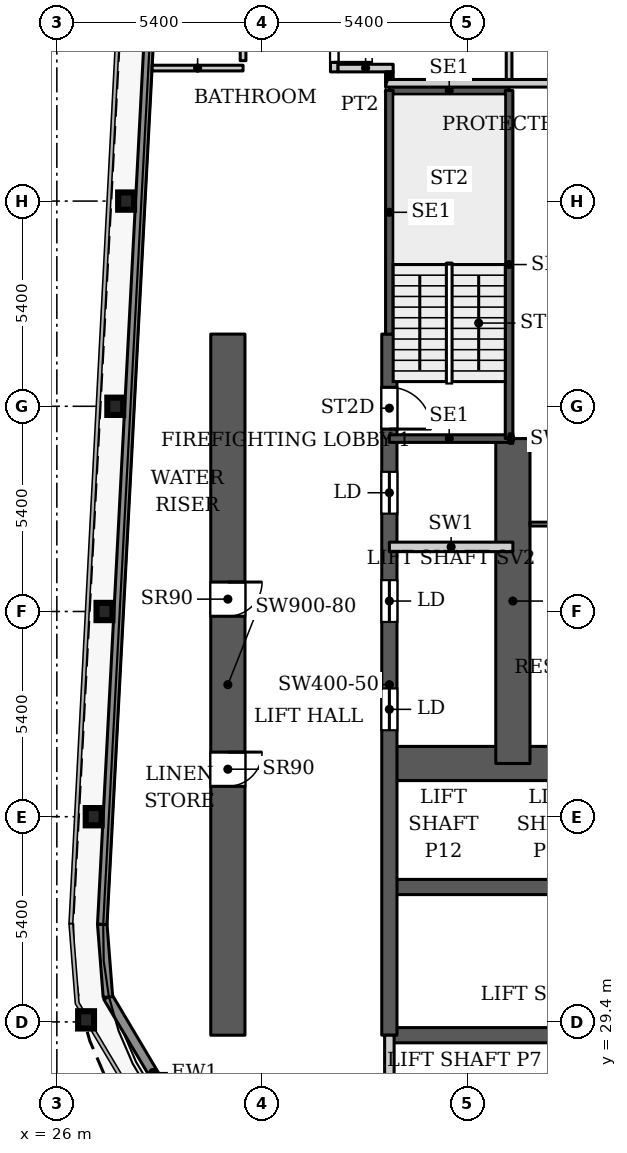
"""IFC4 building model, lengths in metres.
Left out: names, types, materials, properties, quantities, classifications, styles, units other than length and angle.
Written with IfcOpenShell. Run it as: python <this file> out.ifc"""

import sys

from ifc_helpers import new_model, si_unit, direction, frame, frame_2d, origin, origin_2d, place, context, subcontext, project, spatial, rectangle, i_section, extrude, source, transform, mapped, element, fill, save


model = new_model("IFC4")
c1 = context("Model", 3, precision=1e-05, world=origin(), true_north=direction((0.0, 1.0)))
c2 = subcontext(c1, "Body", "Model", "MODEL_VIEW")
j1 = project(units=[si_unit("LENGTHUNIT", "METRE"), si_unit("PLANEANGLEUNIT", "RADIAN")], contexts=[c1])
p1 = place(None, origin())
s1 = spatial("IfcSite", under=j1, at=p1, CompositionType="ELEMENT")
p2 = place(p1, origin())
s2 = spatial("IfcBuilding", under=s1, at=p2, CompositionType="ELEMENT")
p3 = place(p2, frame((0.0, 0.0, 125.3)))
s3 = spatial("IfcBuildingStorey", under=s2, at=p3, CompositionType="ELEMENT", Elevation=125.3)
for number, where, z_axis, x_axis in (
    (1, (26.769, 29.454, 0.0), (0.0, 0.0, 1.0), (1.0, 0.0, 0.0)),
    (2, (26.969, 34.8, 0.0), (0.0, 0.0, 1.0), (1.0, 0.0, 0.0)),
    (3, (27.253, 40.2, 0.0), (0.0, 0.0, 1.0), (1.0, 0.0, 0.0)),
    (4, (27.537, 45.6, 0.0), (0.0, 0.0, 1.0), (1.0, 0.0, 0.0)),
    (5, (27.822, 51.0, 0.0), (0.0, 0.0, 1.0), (1.0, 0.0, 0.0)),
):
    element("IfcColumn", number, at=place(p3, frame(where, z_axis=z_axis, x_axis=x_axis)), inside=s3, PredefinedType="COLUMN", context=c2, shape_type="SweptSolid", body=[
        extrude(i_section(OverallWidth=0.418, OverallDepth=0.455, WebThickness=0.042, FlangeThickness=0.068, FilletRadius=0.014, at=origin_2d()), origin(), (0.0, 0.0, 1.0), 3.9),
    ])
p4 = place(p3, frame((34.75, 29.05, 0.0), z_axis=(0.0, 0.0, 1.0), x_axis=(1.0, 0.0, 0.0)))
e6 = element("IfcWall", 6, at=p4, inside=s3, PredefinedType="SHEAR", context=c2, shape_type="SweptSolid", body=[
    extrude(rectangle(XDim=18.4, YDim=0.4, at=frame_2d((9.2, 0.0))), origin(), (0.0, 0.0, 1.0), 3.9),
])
p5 = place(p4, frame((15.125, 0.0, 0.0)))
e7 = element("IfcOpeningElement", 7, at=p5, cuts=e6, PredefinedType="OPENING", context=c2, shape_type="SweptSolid", body=[
    extrude(rectangle(XDim=1.1, YDim=2.2, at=frame_2d((0.55, 1.1))), frame((0.0, 0.21, 0.0), z_axis=(0.0, -1.0, 0.0), x_axis=(1.0, 0.0, 0.0)), (0.0, 0.0, 1.0), 0.42),
])
p6 = place(p3, frame((34.75, 32.95, 0.0), z_axis=(0.0, 0.0, 1.0), x_axis=(1.0, 0.0, 0.0)))
e8 = element("IfcWall", 8, at=p6, inside=s3, PredefinedType="SHEAR", context=c2, shape_type="SweptSolid", body=[
    extrude(rectangle(XDim=14.25, YDim=0.4, at=frame_2d((7.125, 0.0))), origin(), (0.0, 0.0, 1.0), 3.9),
])
p7 = place(p3, frame((34.75, 36.2, 0.0), z_axis=(0.0, 0.0, 1.0), x_axis=(1.0, 0.0, 0.0)))
e9 = element("IfcWall", 9, at=p7, inside=s3, PredefinedType="SHEAR", context=c2, shape_type="SweptSolid", body=[
    extrude(rectangle(XDim=18.4, YDim=0.9, at=frame_2d((9.2, 0.0))), origin(), (0.0, 0.0, 1.0), 3.9),
])
p8 = place(p7, frame((16.9, 0.0, 0.0)))
e10 = element("IfcOpeningElement", 10, at=p8, cuts=e9, PredefinedType="OPENING", context=c2, shape_type="SweptSolid", body=[
    extrude(rectangle(XDim=1.0, YDim=2.2, at=frame_2d((0.5, 1.1))), frame((0.0, 0.46, 0.0), z_axis=(0.0, -1.0, 0.0), x_axis=(1.0, 0.0, 0.0)), (0.0, 0.0, 1.0), 0.92),
])
p9 = place(p3, frame((34.75, 29.05, 0.0), z_axis=(0.0, 0.0, 1.0), x_axis=(0.0, 1.0, 0.0)))
e11 = element("IfcWall", 11, at=p9, inside=s3, PredefinedType="SHEAR", context=c2, shape_type="SweptSolid", body=[
    extrude(rectangle(XDim=18.45, YDim=0.4, at=frame_2d((9.225, 0.0))), origin(), (0.0, 0.0, 1.0), 3.9),
])
p10 = place(p9, frame((8.025, 0.0, 0.0)))
e12 = element("IfcOpeningElement", 12, at=p10, cuts=e11, PredefinedType="OPENING", context=c2, shape_type="SweptSolid", body=[
    extrude(rectangle(XDim=1.1, YDim=2.2, at=frame_2d((0.55, 1.1))), frame((0.0, 0.21, 0.0), z_axis=(0.0, -1.0, 0.0), x_axis=(1.0, 0.0, 0.0)), (0.0, 0.0, 1.0), 0.42),
])
p11 = place(p9, frame((10.875, 0.0, 0.0)))
e13 = element("IfcOpeningElement", 13, at=p11, cuts=e11, PredefinedType="OPENING", context=c2, shape_type="SweptSolid", body=[
    extrude(rectangle(XDim=1.1, YDim=2.2, at=frame_2d((0.55, 1.1))), frame((0.0, 0.21, 0.0), z_axis=(0.0, -1.0, 0.0), x_axis=(1.0, 0.0, 0.0)), (0.0, 0.0, 1.0), 0.42),
])
p12 = place(p9, frame((13.725, 0.0, 0.0)))
e14 = element("IfcOpeningElement", 14, at=p12, cuts=e11, PredefinedType="OPENING", context=c2, shape_type="SweptSolid", body=[
    extrude(rectangle(XDim=1.1, YDim=2.2, at=frame_2d((0.55, 1.1))), frame((0.0, 0.21, 0.0), z_axis=(0.0, -1.0, 0.0), x_axis=(1.0, 0.0, 0.0)), (0.0, 0.0, 1.0), 0.42),
])
p13 = place(p9, frame((15.95, 0.0, 0.0)))
e15 = element("IfcOpeningElement", 15, at=p13, cuts=e11, PredefinedType="OPENING", context=c2, shape_type="SweptSolid", body=[
    extrude(rectangle(XDim=1.1, YDim=2.2, at=frame_2d((0.55, 1.1))), frame((0.0, 0.21, 0.0), z_axis=(0.0, -1.0, 0.0), x_axis=(1.0, 0.0, 0.0)), (0.0, 0.0, 1.0), 0.42),
])
p14 = place(p3, frame((38.0, 36.2, 0.0), z_axis=(0.0, 0.0, 1.0), x_axis=(0.0, 1.0, 0.0)))
e16 = element("IfcWall", 16, at=p14, inside=s3, PredefinedType="SHEAR", context=c2, shape_type="SweptSolid", body=[
    extrude(rectangle(XDim=8.55, YDim=0.9, at=frame_2d((4.275, 0.0))), origin(), (0.0, 0.0, 1.0), 3.9),
])
p15 = place(p3, frame((30.5, 29.05, 0.0), z_axis=(0.0, 0.0, 1.0), x_axis=(0.0, 1.0, 0.0)))
e17 = element("IfcWall", 17, at=p15, inside=s3, PredefinedType="SHEAR", context=c2, shape_type="SweptSolid", body=[
    extrude(rectangle(XDim=18.45, YDim=0.9, at=frame_2d((9.225, 0.0))), origin(), (0.0, 0.0, 1.0), 3.9),
])
p16 = place(p15, frame((6.55, 0.0, 0.0)))
e18 = element("IfcOpeningElement", 18, at=p16, cuts=e17, PredefinedType="OPENING", context=c2, shape_type="SweptSolid", body=[
    extrude(rectangle(XDim=0.9, YDim=2.2, at=frame_2d((0.45, 1.1))), frame((0.0, 0.46, 0.0), z_axis=(0.0, -1.0, 0.0), x_axis=(1.0, 0.0, 0.0)), (0.0, 0.0, 1.0), 0.92),
])
p17 = place(p15, frame((11.025, 0.0, 0.0)))
e19 = element("IfcOpeningElement", 19, at=p17, cuts=e17, PredefinedType="OPENING", context=c2, shape_type="SweptSolid", body=[
    extrude(rectangle(XDim=0.9, YDim=2.2, at=frame_2d((0.45, 1.1))), frame((0.0, 0.46, 0.0), z_axis=(0.0, -1.0, 0.0), x_axis=(1.0, 0.0, 0.0)), (0.0, 0.0, 1.0), 0.92),
])
p18 = place(p3, frame((29.712, 26.072, 0.0), z_axis=(0.0, 0.0, 1.0), x_axis=(-0.511028049012, 0.859564036662, 0.0)))
e20 = element("IfcWall", 20, at=p18, inside=s3, PredefinedType="SOLIDWALL", context=c2, shape_type="SweptSolid", body=[
    extrude(rectangle(XDim=4.634, YDim=0.25, at=frame_2d((2.317, 0.0))), origin(), (0.0, 0.0, 1.0), 3.147),
])
p19 = place(p3, frame((27.344, 30.055, 0.0), z_axis=(0.0, 0.0, 1.0), x_axis=(-0.077571675317, 0.99698677784, 0.0)))
e21 = element("IfcWall", 21, at=p19, inside=s3, PredefinedType="SOLIDWALL", context=c2, shape_type="SweptSolid", body=[
    extrude(rectangle(XDim=1.92, YDim=0.25, at=frame_2d((0.96, 0.0))), origin(), (0.0, 0.0, 1.0), 3.75),
])
p20 = place(p3, frame((27.195, 31.969, 0.0), z_axis=(0.0, 0.0, 1.0), x_axis=(0.052554995867, 0.998618031286, 0.0)))
e22 = element("IfcWall", 22, at=p20, inside=s3, PredefinedType="SOLIDWALL", context=c2, shape_type="SweptSolid", body=[
    extrude(rectangle(XDim=66.787, YDim=0.25, at=frame_2d((33.394, 0.0))), origin(), (0.0, 0.0, 1.0), 3.75),
])
for number, where, z_axis, x_axis in (
    (23, (34.75, 44.75, 0.0), (0.0, 0.0, 1.0), (1.0, 0.0, 0.0)),
    (24, (34.75, 53.91, 0.0), (0.0, 0.0, 1.0), (1.0, 0.0, 0.0)),
):
    element("IfcWall", number, at=place(p3, frame(where, z_axis=z_axis, x_axis=x_axis)), inside=s3, PredefinedType="SHEAR", context=c2, shape_type="SweptSolid", body=[
        extrude(rectangle(XDim=3.15, YDim=0.2, at=frame_2d((1.575, 0.0))), origin(), (0.0, 0.0, 1.0), 3.9),
    ])
p21 = place(p3, frame((34.75, 47.5, 0.0), z_axis=(0.0, 0.0, 1.0), x_axis=(0.0, 1.0, 0.0)))
e25 = element("IfcWall", 25, at=p21, inside=s3, PredefinedType="SHEAR", context=c2, shape_type="SweptSolid", body=[
    extrude(rectangle(XDim=6.41, YDim=0.2, at=frame_2d((3.205, 0.0))), origin(), (0.0, 0.0, 1.0), 3.9),
])
p22 = place(p3, frame((37.9, 44.75, 0.0), z_axis=(0.0, 0.0, 1.0), x_axis=(0.0, 1.0, 0.0)))
e26 = element("IfcWall", 26, at=p22, inside=s3, PredefinedType="SHEAR", context=c2, shape_type="SweptSolid", body=[
    extrude(rectangle(XDim=9.16, YDim=0.2, at=frame_2d((4.58, 0.0))), origin(), (0.0, 0.0, 1.0), 3.9),
])
for number, where, z_axis, x_axis in (
    (27, (34.75, 25.8, 0.0), (0.0, 0.0, 1.0), (0.0, 1.0, 0.0)),
    (28, (34.75, 41.9, 0.0), (0.0, 0.0, 1.0), (1.0, 0.0, 0.0)),
):
    element("IfcWall", number, at=place(p3, frame(where, z_axis=z_axis, x_axis=x_axis)), inside=s3, PredefinedType="PARTITIONING", context=c2, shape_type="SweptSolid", body=[
        extrude(rectangle(XDim=3.25, YDim=0.25, at=frame_2d((1.625, 0.0))), origin(), (0.0, 0.0, 1.0), 3.9),
    ])
p23 = place(p3, frame((37.9, 44.75, 0.0), z_axis=(0.0, 0.0, 1.0), x_axis=(1.0, 0.0, 0.0)))
e29 = element("IfcWall", 29, at=p23, inside=s3, PredefinedType="PARTITIONING", context=c2, shape_type="SweptSolid", body=[
    extrude(rectangle(XDim=0.1, YDim=0.25, at=frame_2d((0.05, 0.0))), origin(), (0.0, 0.0, 1.0), 3.9),
])
p24 = place(p3, frame((28.508, 54.5, 0.0), z_axis=(0.0, 0.0, 1.0), x_axis=(1.0, 0.0, 0.0)))
e30 = element("IfcWall", 30, at=p24, inside=s3, PredefinedType="PARTITIONING", context=c2, shape_type="SweptSolid", body=[
    extrude(rectangle(XDim=2.392, YDim=0.15, at=frame_2d((1.196, 0.0))), origin(), (0.0, 0.0, 1.0), 3.9),
])
p25 = place(p3, frame((30.9, 54.695, 0.0), z_axis=(0.0, 0.0, 1.0), x_axis=(0.0, 1.0, 0.0)))
e31 = element("IfcWall", 31, at=p25, inside=s3, PredefinedType="PARTITIONING", context=c2, shape_type="SweptSolid", body=[
    extrude(rectangle(XDim=10.105, YDim=0.15, at=frame_2d((5.052, 0.0))), origin(), (0.0, 0.0, 1.0), 3.072),
])
p26 = place(p25, frame((4.505, 0.0, 0.0)))
e32 = element("IfcOpeningElement", 32, at=p26, cuts=e31, PredefinedType="OPENING", context=c2, shape_type="SweptSolid", body=[
    extrude(rectangle(XDim=0.9, YDim=2.2, at=frame_2d((0.45, 1.1))), frame((0.0, 0.085, 0.0), z_axis=(0.0, -1.0, 0.0), x_axis=(1.0, 0.0, 0.0)), (0.0, 0.0, 1.0), 0.17),
])
p27 = place(p3, frame((33.3, 54.4, 0.0), z_axis=(0.0, 0.0, 1.0), x_axis=(0.0, 1.0, 0.0)))
e33 = element("IfcWall", 33, at=p27, inside=s3, PredefinedType="PARTITIONING", context=c2, shape_type="SweptSolid", body=[
    extrude(rectangle(XDim=24.95, YDim=0.2, at=frame_2d((12.475, 0.0))), origin(), (0.0, 0.0, 1.0), 3.6),
])
p28 = place(p27, frame((0.25, 0.0, 0.0)))
e34 = element("IfcOpeningElement", 34, at=p28, cuts=e33, PredefinedType="OPENING", context=c2, shape_type="SweptSolid", body=[
    extrude(rectangle(XDim=1.0, YDim=2.1, at=frame_2d((0.5, 1.05))), frame((0.0, 0.11, 0.0), z_axis=(0.0, -1.0, 0.0), x_axis=(1.0, 0.0, 0.0)), (0.0, 0.0, 1.0), 0.22),
])
p29 = place(p27, frame((20.5, 0.0, 0.0)))
e35 = element("IfcOpeningElement", 35, at=p29, cuts=e33, PredefinedType="OPENING", context=c2, shape_type="SweptSolid", body=[
    extrude(rectangle(XDim=1.0, YDim=2.1, at=frame_2d((0.5, 1.05))), frame((0.0, 0.11, 0.0), z_axis=(0.0, -1.0, 0.0), x_axis=(1.0, 0.0, 0.0)), (0.0, 0.0, 1.0), 0.22),
])
p30 = place(p3, frame((33.4, 54.5, 0.0), z_axis=(0.0, 0.0, 1.0), x_axis=(1.0, 0.0, 0.0)))
e36 = element("IfcWall", 36, at=p30, inside=s3, PredefinedType="PARTITIONING", context=c2, shape_type="SweptSolid", body=[
    extrude(rectangle(XDim=1.45, YDim=0.2, at=frame_2d((0.725, 0.0))), origin(), (0.0, 0.0, 1.0), 3.6),
])
p31 = place(p3, frame((34.65, 54.1, 0.0), z_axis=(0.0, 0.0, 1.0), x_axis=(1.0, 0.0, 0.0)))
e37 = element("IfcWall", 37, at=p31, inside=s3, PredefinedType="PARTITIONING", context=c2, shape_type="SweptSolid", body=[
    extrude(rectangle(XDim=11.25, YDim=0.2, at=frame_2d((5.625, 0.0))), origin(), (0.0, 0.0, 1.0), 3.6),
])
p32 = place(p3, frame((34.75, 54.2, 0.0), z_axis=(0.0, 0.0, 1.0), x_axis=(0.0, 1.0, 0.0)))
e38 = element("IfcWall", 38, at=p32, inside=s3, PredefinedType="PARTITIONING", context=c2, shape_type="SweptSolid", body=[
    extrude(rectangle(XDim=0.2, YDim=0.2, at=frame_2d((0.1, 0.0))), origin(), (0.0, 0.0, 1.0), 3.6),
])
p33 = place(p3, frame((37.9, 54.2, 0.0), z_axis=(0.0, 0.0, 1.0), x_axis=(0.0, 1.0, 0.0)))
e39 = element("IfcWall", 39, at=p33, inside=s3, PredefinedType="PARTITIONING", context=c2, shape_type="SweptSolid", body=[
    extrude(rectangle(XDim=9.4, YDim=0.15, at=frame_2d((4.7, 0.0))), origin(), (0.0, 0.0, 1.0), 3.6),
])
p34 = place(p33, frame((7.1, 0.0, 0.0)))
e40 = element("IfcOpeningElement", 40, at=p34, cuts=e39, PredefinedType="OPENING", context=c2, shape_type="SweptSolid", body=[
    extrude(rectangle(XDim=0.9, YDim=2.1, at=frame_2d((0.45, 1.05))), frame((0.0, 0.085, 0.0), z_axis=(0.0, -1.0, 0.0), x_axis=(1.0, 0.0, 0.0)), (0.0, 0.0, 1.0), 0.17),
])
p35 = place(p33, frame((2.25, 0.0, 0.0)))
e41 = element("IfcOpeningElement", 41, at=p35, cuts=e39, PredefinedType="OPENING", context=c2, shape_type="SweptSolid", body=[
    extrude(rectangle(XDim=1.0, YDim=2.1, at=frame_2d((0.5, 1.05))), frame((0.0, 0.085, 0.0), z_axis=(0.0, -1.0, 0.0), x_axis=(1.0, 0.0, 0.0)), (0.0, 0.0, 1.0), 0.17),
])
p36 = place(p3, frame((38.449, 42.5, 0.0), z_axis=(0.0, 0.0, 1.0), x_axis=(1.0, 0.0, 0.0)))
e42 = element("IfcWall", 42, at=p36, inside=s3, PredefinedType="PARTITIONING", context=c2, shape_type="SweptSolid", body=[
    extrude(rectangle(XDim=14.951, YDim=0.1, at=frame_2d((7.476, 0.0))), origin(), (0.0, 0.0, 1.0), 3.6),
])
m1 = source(origin(), c2, "Body", "SweptSolid", [
    extrude(rectangle(XDim=1.1, YDim=2.2, at=frame_2d((0.55, 1.1))), frame((0.0, 0.025, 0.0), z_axis=(0.0, -1.0, 0.0), x_axis=(1.0, 0.0, 0.0)), (0.0, 0.0, 1.0), 0.05),
])
p37 = place(p10, origin())
e43 = element("IfcDoor", 43, at=p37, inside=s3, OperationType="SLIDING_TO_LEFT", PredefinedType="DOOR", context=c2, shape_type="MappedRepresentation", body=[
    mapped(m1, transform((0.0, 0.0, 0.0), x_axis=(1.0, 0.0, 0.0), y_axis=(0.0, 1.0, 0.0), z_axis=(0.0, 0.0, 1.0), scale=1.0)),
])
fill(e12, e43)
p38 = place(p11, origin())
e44 = element("IfcDoor", 44, at=p38, inside=s3, OperationType="SLIDING_TO_LEFT", PredefinedType="DOOR", context=c2, shape_type="MappedRepresentation", body=[
    mapped(m1, transform((0.0, 0.0, 0.0), x_axis=(1.0, 0.0, 0.0), y_axis=(0.0, 1.0, 0.0), z_axis=(0.0, 0.0, 1.0), scale=1.0)),
])
fill(e13, e44)
p39 = place(p12, origin())
e45 = element("IfcDoor", 45, at=p39, inside=s3, OperationType="SLIDING_TO_LEFT", PredefinedType="DOOR", context=c2, shape_type="MappedRepresentation", body=[
    mapped(m1, transform((0.0, 0.0, 0.0), x_axis=(1.0, 0.0, 0.0), y_axis=(0.0, 1.0, 0.0), z_axis=(0.0, 0.0, 1.0), scale=1.0)),
])
fill(e14, e45)
m2 = source(origin(), c2, "Body", "SweptSolid", [
    extrude(rectangle(XDim=0.9, YDim=2.2, at=frame_2d((0.45, 1.1))), frame((0.0, 0.025, 0.0), z_axis=(0.0, -1.0, 0.0), x_axis=(1.0, 0.0, 0.0)), (0.0, 0.0, 1.0), 0.05),
])
p40 = place(p16, origin())
e46 = element("IfcDoor", 46, at=p40, inside=s3, OperationType="SINGLE_SWING_RIGHT", PredefinedType="DOOR", context=c2, shape_type="MappedRepresentation", body=[
    mapped(m2, transform((0.0, 0.0, 0.0), x_axis=(1.0, 0.0, 0.0), y_axis=(0.0, 1.0, 0.0), z_axis=(0.0, 0.0, 1.0), scale=1.0)),
])
fill(e18, e46)
p41 = place(p17, origin())
e47 = element("IfcDoor", 47, at=p41, inside=s3, OperationType="SINGLE_SWING_RIGHT", PredefinedType="DOOR", context=c2, shape_type="MappedRepresentation", body=[
    mapped(m2, transform((0.0, 0.0, 0.0), x_axis=(1.0, 0.0, 0.0), y_axis=(0.0, 1.0, 0.0), z_axis=(0.0, 0.0, 1.0), scale=1.0)),
])
fill(e19, e47)
m3 = source(origin(), c2, "Body", "SweptSolid", [
    extrude(rectangle(XDim=1.1, YDim=2.2, at=frame_2d((0.55, 1.1))), frame((0.0, 0.025, 0.0), z_axis=(0.0, -1.0, 0.0), x_axis=(1.0, 0.0, 0.0)), (0.0, 0.0, 1.0), 0.05),
])
p42 = place(p13, origin())
e48 = element("IfcDoor", 48, at=p42, inside=s3, OperationType="SINGLE_SWING_RIGHT", PredefinedType="DOOR", context=c2, shape_type="MappedRepresentation", body=[
    mapped(m3, transform((0.0, 0.0, 0.0), x_axis=(1.0, 0.0, 0.0), y_axis=(0.0, 1.0, 0.0), z_axis=(0.0, 0.0, 1.0), scale=1.0)),
])
fill(e15, e48)
m4 = source(origin(), c2, "Body", "SweptSolid", [
    extrude(rectangle(XDim=1.0, YDim=2.1, at=frame_2d((0.5, 1.05))), frame((0.0, 0.025, 0.0), z_axis=(0.0, -1.0, 0.0), x_axis=(1.0, 0.0, 0.0)), (0.0, 0.0, 1.0), 0.05),
])
p43 = place(p28, origin())
e49 = element("IfcDoor", 49, at=p43, inside=s3, OperationType="SINGLE_SWING_RIGHT", PredefinedType="DOOR", context=c2, shape_type="MappedRepresentation", body=[
    mapped(m4, transform((0.0, 0.0, 0.0), x_axis=(1.0, 0.0, 0.0), y_axis=(0.0, 1.0, 0.0), z_axis=(0.0, 0.0, 1.0), scale=1.0)),
])
fill(e34, e49)
save(model, sys.argv[1])
